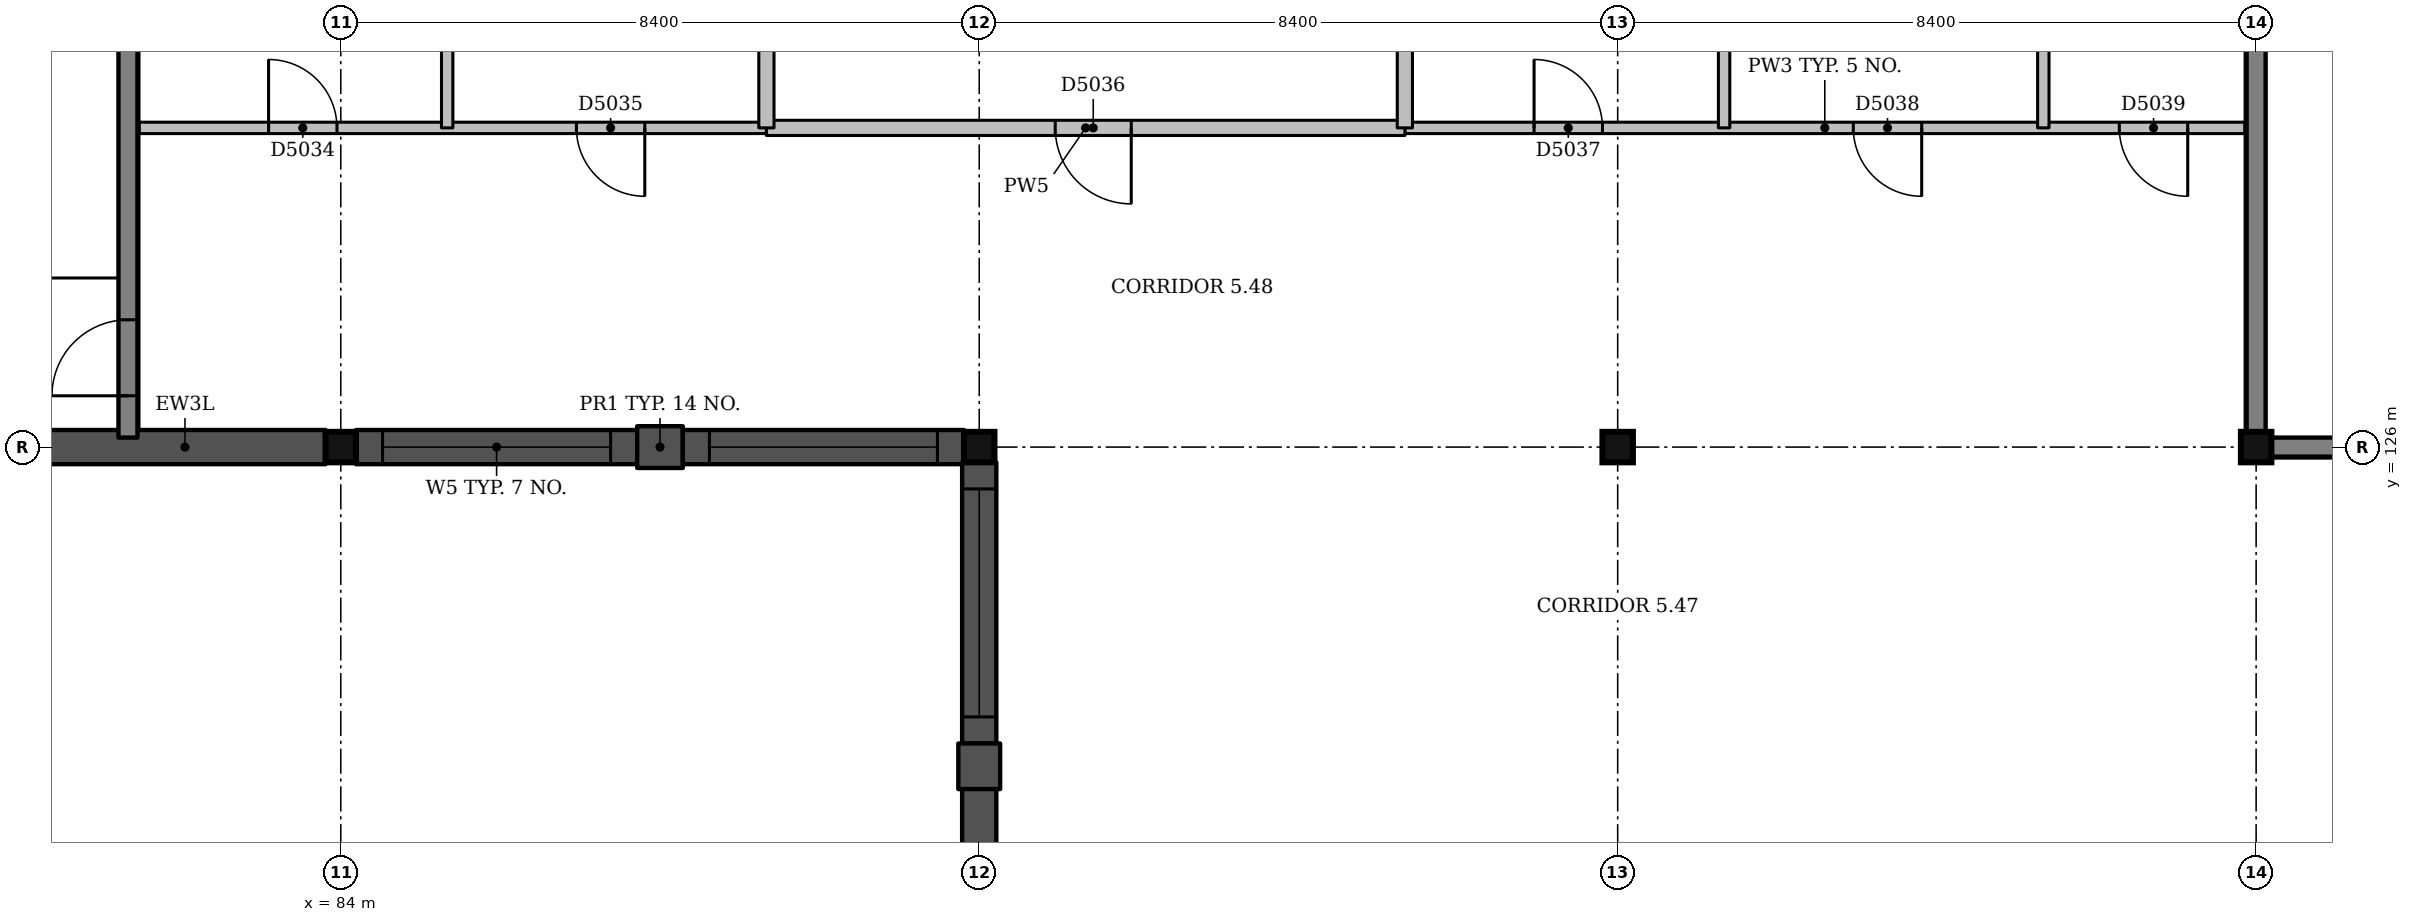
"""IFC4 building model, lengths in metres.
Left out: names, types, materials, properties, quantities, classifications, styles, units other than length and angle.
Written with IfcOpenShell. Run it as: python <this file> out.ifc"""

import sys

from ifc_helpers import new_model, si_unit, direction, frame, frame_2d, origin, origin_2d, place, context, subcontext, project, spatial, rectangle, extrude, element, fill, save


model = new_model("IFC4")
c1 = context("Model", 3, precision=1e-05, world=origin(), true_north=direction((0.0, 1.0)))
c2 = subcontext(c1, "Body", "Model", "MODEL_VIEW")
j1 = project(units=[si_unit("LENGTHUNIT", "METRE"), si_unit("PLANEANGLEUNIT", "RADIAN")], contexts=[c1])
p1 = place(None, origin())
s1 = spatial("IfcSite", under=j1, at=p1, CompositionType="ELEMENT")
p2 = place(p1, origin())
s2 = spatial("IfcBuilding", under=s1, at=p2, CompositionType="ELEMENT")
p3 = place(p2, frame((0.0, 0.0, 22.5)))
s3 = spatial("IfcBuildingStorey", under=s2, at=p3, CompositionType="ELEMENT", Elevation=22.5)
for number, where, z_axis, x_axis in (
    (1, (84.0, 126.0, 0.0), (0.0, 0.0, 1.0), (1.0, 0.0, 0.0)),
    (2, (92.4, 126.0, 0.0), (0.0, 0.0, 1.0), (1.0, 0.0, 0.0)),
    (3, (100.8, 126.0, 0.0), (0.0, 0.0, 1.0), (1.0, 0.0, 0.0)),
    (4, (109.2, 126.0, 0.0), (0.0, 0.0, 1.0), (1.0, 0.0, 0.0)),
):
    element("IfcColumn", number, at=place(p3, frame(where, z_axis=z_axis, x_axis=x_axis)), inside=s3, PredefinedType="COLUMN", context=c2, shape_type="SweptSolid", body=[
        extrude(rectangle(XDim=0.4, YDim=0.4, at=origin_2d()), origin(), (0.0, 0.0, 1.0), 4.5),
    ])
p4 = place(p3, frame((109.4, 126.0, 0.0), z_axis=(0.0, 0.0, 1.0), x_axis=(1.0, 0.0, 0.0)))
e5 = element("IfcWall", 5, at=p4, inside=s3, PredefinedType="SHEAR", context=c2, shape_type="SweptSolid", body=[
    extrude(rectangle(XDim=5.525, YDim=0.25, at=frame_2d((2.763, 0.0))), origin(), (0.0, 0.0, 1.0), 4.2),
])
p5 = place(p3, frame((109.2, 126.2, 0.0), z_axis=(0.0, 0.0, 1.0), x_axis=(0.0, 1.0, 0.0)))
e6 = element("IfcWall", 6, at=p5, inside=s3, PredefinedType="SHEAR", context=c2, shape_type="SweptSolid", body=[
    extrude(rectangle(XDim=8.0, YDim=0.25, at=frame_2d((4.0, 0.0))), origin(), (0.0, 0.0, 1.0), 4.2),
])
p6 = place(p5, frame((6.45, 0.0, 0.0)))
e7 = element("IfcOpeningElement", 7, at=p6, cuts=e6, PredefinedType="OPENING", context=c2, shape_type="SweptSolid", body=[
    extrude(rectangle(XDim=1.0, YDim=2.1, at=frame_2d((0.5, 1.05))), frame((0.0, 0.135, 0.0), z_axis=(0.0, -1.0, 0.0), x_axis=(1.0, 0.0, 0.0)), (0.0, 0.0, 1.0), 0.27),
])
p7 = place(p3, frame((81.2, 126.125, 0.0), z_axis=(0.0, 0.0, 1.0), x_axis=(0.0, 1.0, 0.0)))
e8 = element("IfcWall", 8, at=p7, inside=s3, PredefinedType="SHEAR", context=c2, shape_type="SweptSolid", body=[
    extrude(rectangle(XDim=8.15, YDim=0.25, at=frame_2d((4.075, 0.0))), origin(), (0.0, 0.0, 1.0), 4.2),
])
p8 = place(p7, frame((0.55, 0.0, 0.0)))
e9 = element("IfcOpeningElement", 9, at=p8, cuts=e8, PredefinedType="OPENING", context=c2, shape_type="SweptSolid", body=[
    extrude(rectangle(XDim=1.0, YDim=2.1, at=frame_2d((0.5, 1.05))), frame((0.0, 0.135, 0.0), z_axis=(0.0, -1.0, 0.0), x_axis=(1.0, 0.0, 0.0)), (0.0, 0.0, 1.0), 0.27),
])
p9 = place(p3, frame((80.1, 126.0, 0.0), z_axis=(0.0, 0.0, 1.0), x_axis=(1.0, 0.0, 0.0)))
e10 = element("IfcWall", 10, at=p9, inside=s3, PredefinedType="SOLIDWALL", context=c2, shape_type="SweptSolid", body=[
    extrude(rectangle(XDim=3.7, YDim=0.45, at=frame_2d((1.85, 0.0))), origin(), (0.0, 0.0, 1.0), 3.6),
])
p10 = place(p3, frame((84.2, 126.0, 0.0), z_axis=(0.0, 0.0, 1.0), x_axis=(1.0, 0.0, 0.0)))
e11 = element("IfcWall", 11, at=p10, inside=s3, PredefinedType="SOLIDWALL", context=c2, shape_type="SweptSolid", body=[
    extrude(rectangle(XDim=3.7, YDim=0.45, at=frame_2d((1.85, 0.0))), origin(), (0.0, 0.0, 1.0), 3.6),
])
p11 = place(p10, frame((0.35, 0.0, 0.9)))
e12 = element("IfcOpeningElement", 12, at=p11, cuts=e11, PredefinedType="OPENING", context=c2, shape_type="SweptSolid", body=[
    extrude(rectangle(XDim=3.0, YDim=2.1, at=frame_2d((1.5, 1.05))), frame((0.0, 0.235, 0.0), z_axis=(0.0, -1.0, 0.0), x_axis=(1.0, 0.0, 0.0)), (0.0, 0.0, 1.0), 0.47),
])
p12 = place(p3, frame((87.9, 126.0, 0.0), z_axis=(0.0, 0.0, 1.0), x_axis=(1.0, 0.0, 0.0)))
e13 = element("IfcWall", 13, at=p12, inside=s3, PredefinedType="SOLIDWALL", context=c2, shape_type="SweptSolid", body=[
    extrude(rectangle(XDim=0.6, YDim=0.55, at=frame_2d((0.3, 0.0))), origin(), (0.0, 0.0, 1.0), 3.6),
])
p13 = place(p3, frame((88.5, 126.0, 0.0), z_axis=(0.0, 0.0, 1.0), x_axis=(1.0, 0.0, 0.0)))
e14 = element("IfcWall", 14, at=p13, inside=s3, PredefinedType="SOLIDWALL", context=c2, shape_type="SweptSolid", body=[
    extrude(rectangle(XDim=3.7, YDim=0.45, at=frame_2d((1.85, 0.0))), origin(), (0.0, 0.0, 1.0), 3.6),
])
p14 = place(p13, frame((0.35, 0.0, 0.9)))
e15 = element("IfcOpeningElement", 15, at=p14, cuts=e14, PredefinedType="OPENING", context=c2, shape_type="SweptSolid", body=[
    extrude(rectangle(XDim=3.0, YDim=2.1, at=frame_2d((1.5, 1.05))), frame((0.0, 0.235, 0.0), z_axis=(0.0, -1.0, 0.0), x_axis=(1.0, 0.0, 0.0)), (0.0, 0.0, 1.0), 0.47),
])
p15 = place(p3, frame((92.4, 125.8, 0.0), z_axis=(0.0, 0.0, 1.0), x_axis=(0.0, -1.0, 0.0)))
e16 = element("IfcWall", 16, at=p15, inside=s3, PredefinedType="SOLIDWALL", context=c2, shape_type="SweptSolid", body=[
    extrude(rectangle(XDim=3.7, YDim=0.45, at=frame_2d((1.85, 0.0))), origin(), (0.0, 0.0, 1.0), 3.6),
])
p16 = place(p15, frame((0.35, 0.0, 0.9)))
e17 = element("IfcOpeningElement", 17, at=p16, cuts=e16, PredefinedType="OPENING", context=c2, shape_type="SweptSolid", body=[
    extrude(rectangle(XDim=3.0, YDim=2.1, at=frame_2d((1.5, 1.05))), frame((0.0, 0.235, 0.0), z_axis=(0.0, -1.0, 0.0), x_axis=(1.0, 0.0, 0.0)), (0.0, 0.0, 1.0), 0.47),
])
p17 = place(p3, frame((92.4, 122.1, 0.0), z_axis=(0.0, 0.0, 1.0), x_axis=(0.0, -1.0, 0.0)))
e18 = element("IfcWall", 18, at=p17, inside=s3, PredefinedType="SOLIDWALL", context=c2, shape_type="SweptSolid", body=[
    extrude(rectangle(XDim=0.6, YDim=0.55, at=frame_2d((0.3, 0.0))), origin(), (0.0, 0.0, 1.0), 3.6),
])
p18 = place(p3, frame((92.4, 121.5, 0.0), z_axis=(0.0, 0.0, 1.0), x_axis=(0.0, -1.0, 0.0)))
e19 = element("IfcWall", 19, at=p18, inside=s3, PredefinedType="SOLIDWALL", context=c2, shape_type="SweptSolid", body=[
    extrude(rectangle(XDim=3.7, YDim=0.45, at=frame_2d((1.85, 0.0))), origin(), (0.0, 0.0, 1.0), 3.6),
])
p19 = place(p3, frame((81.35, 130.2, 0.0), z_axis=(0.0, 0.0, 1.0), x_axis=(1.0, 0.0, 0.0)))
e20 = element("IfcWall", 20, at=p19, inside=s3, PredefinedType="PARTITIONING", context=c2, shape_type="SweptSolid", body=[
    extrude(rectangle(XDim=8.25, YDim=0.15, at=frame_2d((4.125, 0.0))), origin(), (0.0, 0.0, 1.0), 3.6),
])
p20 = place(p19, frame((1.7, 0.0, 0.0)))
e21 = element("IfcOpeningElement", 21, at=p20, cuts=e20, PredefinedType="OPENING", context=c2, shape_type="SweptSolid", body=[
    extrude(rectangle(XDim=0.9, YDim=2.1, at=frame_2d((0.45, 1.05))), frame((0.0, 0.085, 0.0), z_axis=(0.0, -1.0, 0.0), x_axis=(1.0, 0.0, 0.0)), (0.0, 0.0, 1.0), 0.17),
])
p21 = place(p19, frame((5.75, 0.0, 0.0)))
e22 = element("IfcOpeningElement", 22, at=p21, cuts=e20, PredefinedType="OPENING", context=c2, shape_type="SweptSolid", body=[
    extrude(rectangle(XDim=0.9, YDim=2.1, at=frame_2d((0.45, 1.05))), frame((0.0, 0.085, 0.0), z_axis=(0.0, -1.0, 0.0), x_axis=(1.0, 0.0, 0.0)), (0.0, 0.0, 1.0), 0.17),
])
p22 = place(p3, frame((98.0, 130.2, 0.0), z_axis=(0.0, 0.0, 1.0), x_axis=(1.0, 0.0, 0.0)))
e23 = element("IfcWall", 23, at=p22, inside=s3, PredefinedType="PARTITIONING", context=c2, shape_type="SweptSolid", body=[
    extrude(rectangle(XDim=11.05, YDim=0.15, at=frame_2d((5.525, 0.0))), origin(), (0.0, 0.0, 1.0), 3.6),
])
p23 = place(p22, frame((1.7, 0.0, 0.0)))
e24 = element("IfcOpeningElement", 24, at=p23, cuts=e23, PredefinedType="OPENING", context=c2, shape_type="SweptSolid", body=[
    extrude(rectangle(XDim=0.9, YDim=2.1, at=frame_2d((0.45, 1.05))), frame((0.0, 0.085, 0.0), z_axis=(0.0, -1.0, 0.0), x_axis=(1.0, 0.0, 0.0)), (0.0, 0.0, 1.0), 0.17),
])
p24 = place(p22, frame((5.9, 0.0, 0.0)))
e25 = element("IfcOpeningElement", 25, at=p24, cuts=e23, PredefinedType="OPENING", context=c2, shape_type="SweptSolid", body=[
    extrude(rectangle(XDim=0.9, YDim=2.1, at=frame_2d((0.45, 1.05))), frame((0.0, 0.085, 0.0), z_axis=(0.0, -1.0, 0.0), x_axis=(1.0, 0.0, 0.0)), (0.0, 0.0, 1.0), 0.17),
])
p25 = place(p22, frame((9.4, 0.0, 0.0)))
e26 = element("IfcOpeningElement", 26, at=p25, cuts=e23, PredefinedType="OPENING", context=c2, shape_type="SweptSolid", body=[
    extrude(rectangle(XDim=0.9, YDim=2.1, at=frame_2d((0.45, 1.05))), frame((0.0, 0.085, 0.0), z_axis=(0.0, -1.0, 0.0), x_axis=(1.0, 0.0, 0.0)), (0.0, 0.0, 1.0), 0.17),
])
p26 = place(p3, frame((89.6, 130.2, 0.0), z_axis=(0.0, 0.0, 1.0), x_axis=(1.0, 0.0, 0.0)))
e27 = element("IfcWall", 27, at=p26, inside=s3, PredefinedType="PARTITIONING", context=c2, shape_type="SweptSolid", body=[
    extrude(rectangle(XDim=8.4, YDim=0.2, at=frame_2d((4.2, 0.0))), origin(), (0.0, 0.0, 1.0), 3.6),
])
p27 = place(p26, frame((3.8, 0.0, 0.0)))
e28 = element("IfcOpeningElement", 28, at=p27, cuts=e27, PredefinedType="OPENING", context=c2, shape_type="SweptSolid", body=[
    extrude(rectangle(XDim=1.0, YDim=2.1, at=frame_2d((0.5, 1.05))), frame((0.0, 0.11, 0.0), z_axis=(0.0, -1.0, 0.0), x_axis=(1.0, 0.0, 0.0)), (0.0, 0.0, 1.0), 0.22),
])
p28 = place(p3, frame((85.4, 130.2, 0.0), z_axis=(0.0, 0.0, 1.0), x_axis=(0.0, 1.0, 0.0)))
e29 = element("IfcWall", 29, at=p28, inside=s3, PredefinedType="PARTITIONING", context=c2, shape_type="SweptSolid", body=[
    extrude(rectangle(XDim=3.975, YDim=0.15, at=frame_2d((1.988, 0.0))), origin(), (0.0, 0.0, 1.0), 4.15),
])
for number, where, z_axis, x_axis in (
    (30, (89.6, 130.2, 0.0), (0.0, 0.0, 1.0), (0.0, 1.0, 0.0)),
    (31, (98.0, 130.2, 0.0), (0.0, 0.0, 1.0), (0.0, 1.0, 0.0)),
):
    element("IfcWall", number, at=place(p3, frame(where, z_axis=z_axis, x_axis=x_axis)), inside=s3, PredefinedType="PARTITIONING", context=c2, shape_type="SweptSolid", body=[
        extrude(rectangle(XDim=3.975, YDim=0.2, at=frame_2d((1.988, 0.0))), origin(), (0.0, 0.0, 1.0), 4.15),
    ])
p29 = place(p3, frame((102.2, 130.2, 0.0), z_axis=(0.0, 0.0, 1.0), x_axis=(0.0, 1.0, 0.0)))
e32 = element("IfcWall", 32, at=p29, inside=s3, PredefinedType="PARTITIONING", context=c2, shape_type="SweptSolid", body=[
    extrude(rectangle(XDim=3.975, YDim=0.15, at=frame_2d((1.988, 0.0))), origin(), (0.0, 0.0, 1.0), 4.15),
])
p30 = place(p3, frame((106.4, 130.2, 0.0), z_axis=(0.0, 0.0, 1.0), x_axis=(0.0, 1.0, 0.0)))
e33 = element("IfcWall", 33, at=p30, inside=s3, PredefinedType="PARTITIONING", context=c2, shape_type="SweptSolid", body=[
    extrude(rectangle(XDim=4.2, YDim=0.15, at=frame_2d((2.1, 0.0))), origin(), (0.0, 0.0, 1.0), 2.37),
])
p31 = place(p11, origin())
e34 = element("IfcWindow", 34, at=p31, inside=s3, PartitioningType="SINGLE_PANEL", PredefinedType="WINDOW", context=c2, shape_type="SweptSolid", body=[
    extrude(rectangle(XDim=3.0, YDim=2.1, at=frame_2d((1.5, 1.05))), frame((0.0, 0.135, 0.0), z_axis=(0.0, -1.0, 0.0), x_axis=(1.0, 0.0, 0.0)), (0.0, 0.0, 1.0), 0.06),
])
fill(e12, e34)
p32 = place(p14, origin())
e35 = element("IfcWindow", 35, at=p32, inside=s3, PartitioningType="SINGLE_PANEL", PredefinedType="WINDOW", context=c2, shape_type="SweptSolid", body=[
    extrude(rectangle(XDim=3.0, YDim=2.1, at=frame_2d((1.5, 1.05))), frame((0.0, 0.135, 0.0), z_axis=(0.0, -1.0, 0.0), x_axis=(1.0, 0.0, 0.0)), (0.0, 0.0, 1.0), 0.06),
])
fill(e15, e35)
p33 = place(p16, origin())
e36 = element("IfcWindow", 36, at=p33, inside=s3, PartitioningType="SINGLE_PANEL", PredefinedType="WINDOW", context=c2, shape_type="SweptSolid", body=[
    extrude(rectangle(XDim=3.0, YDim=2.1, at=frame_2d((1.5, 1.05))), frame((0.0, 0.135, 0.0), z_axis=(0.0, -1.0, 0.0), x_axis=(1.0, 0.0, 0.0)), (0.0, 0.0, 1.0), 0.06),
])
fill(e17, e36)
p34 = place(p3, frame((0.0, 0.0, 4.2)))
p35 = place(p34, frame((105.0, 121.8, 0.0)))
p36 = place(p35, frame((0.0, 0.0, 0.25)))
e37 = element("IfcWindow", 37, at=p36, inside=s3, PartitioningType="SINGLE_PANEL", PredefinedType="SKYLIGHT", context=c2, shape_type="SweptSolid", body=[
    extrude(rectangle(XDim=0.9, YDim=1.2, at=origin_2d()), origin(), (0.0, 0.0, 1.0), 0.05),
])
p37 = place(p20, origin())
e38 = element("IfcDoor", 38, at=p37, inside=s3, OperationType="SINGLE_SWING_LEFT", PredefinedType="DOOR", context=c2, shape_type="SweptSolid", body=[
    extrude(rectangle(XDim=0.9, YDim=2.1, at=frame_2d((0.45, 1.05))), frame((0.0, 0.025, 0.0), z_axis=(0.0, -1.0, 0.0), x_axis=(1.0, 0.0, 0.0)), (0.0, 0.0, 1.0), 0.05),
])
fill(e21, e38)
p38 = place(p21, origin())
e39 = element("IfcDoor", 39, at=p38, inside=s3, OperationType="SINGLE_SWING_RIGHT", PredefinedType="DOOR", context=c2, shape_type="SweptSolid", body=[
    extrude(rectangle(XDim=0.9, YDim=2.1, at=frame_2d((0.45, 1.05))), frame((0.0, 0.025, 0.0), z_axis=(0.0, -1.0, 0.0), x_axis=(1.0, 0.0, 0.0)), (0.0, 0.0, 1.0), 0.05),
])
fill(e22, e39)
p39 = place(p27, origin())
e40 = element("IfcDoor", 40, at=p39, inside=s3, OperationType="SINGLE_SWING_RIGHT", PredefinedType="DOOR", context=c2, shape_type="SweptSolid", body=[
    extrude(rectangle(XDim=1.0, YDim=2.1, at=frame_2d((0.5, 1.05))), frame((0.0, 0.025, 0.0), z_axis=(0.0, -1.0, 0.0), x_axis=(1.0, 0.0, 0.0)), (0.0, 0.0, 1.0), 0.05),
])
fill(e28, e40)
p40 = place(p23, origin())
e41 = element("IfcDoor", 41, at=p40, inside=s3, OperationType="SINGLE_SWING_LEFT", PredefinedType="DOOR", context=c2, shape_type="SweptSolid", body=[
    extrude(rectangle(XDim=0.9, YDim=2.1, at=frame_2d((0.45, 1.05))), frame((0.0, 0.025, 0.0), z_axis=(0.0, -1.0, 0.0), x_axis=(1.0, 0.0, 0.0)), (0.0, 0.0, 1.0), 0.05),
])
fill(e24, e41)
p41 = place(p24, origin())
e42 = element("IfcDoor", 42, at=p41, inside=s3, OperationType="SINGLE_SWING_RIGHT", PredefinedType="DOOR", context=c2, shape_type="SweptSolid", body=[
    extrude(rectangle(XDim=0.9, YDim=2.1, at=frame_2d((0.45, 1.05))), frame((0.0, 0.025, 0.0), z_axis=(0.0, -1.0, 0.0), x_axis=(1.0, 0.0, 0.0)), (0.0, 0.0, 1.0), 0.05),
])
fill(e25, e42)
p42 = place(p25, origin())
e43 = element("IfcDoor", 43, at=p42, inside=s3, OperationType="SINGLE_SWING_RIGHT", PredefinedType="DOOR", context=c2, shape_type="SweptSolid", body=[
    extrude(rectangle(XDim=0.9, YDim=2.1, at=frame_2d((0.45, 1.05))), frame((0.0, 0.025, 0.0), z_axis=(0.0, -1.0, 0.0), x_axis=(1.0, 0.0, 0.0)), (0.0, 0.0, 1.0), 0.05),
])
fill(e26, e43)
p43 = place(p8, origin())
e44 = element("IfcDoor", 44, at=p43, inside=s3, OperationType="SINGLE_SWING_LEFT", PredefinedType="DOOR", context=c2, shape_type="SweptSolid", body=[
    extrude(rectangle(XDim=1.0, YDim=2.1, at=frame_2d((0.5, 1.05))), frame((0.0, 0.025, 0.0), z_axis=(0.0, -1.0, 0.0), x_axis=(1.0, 0.0, 0.0)), (0.0, 0.0, 1.0), 0.05),
])
fill(e9, e44)
save(model, sys.argv[1])
